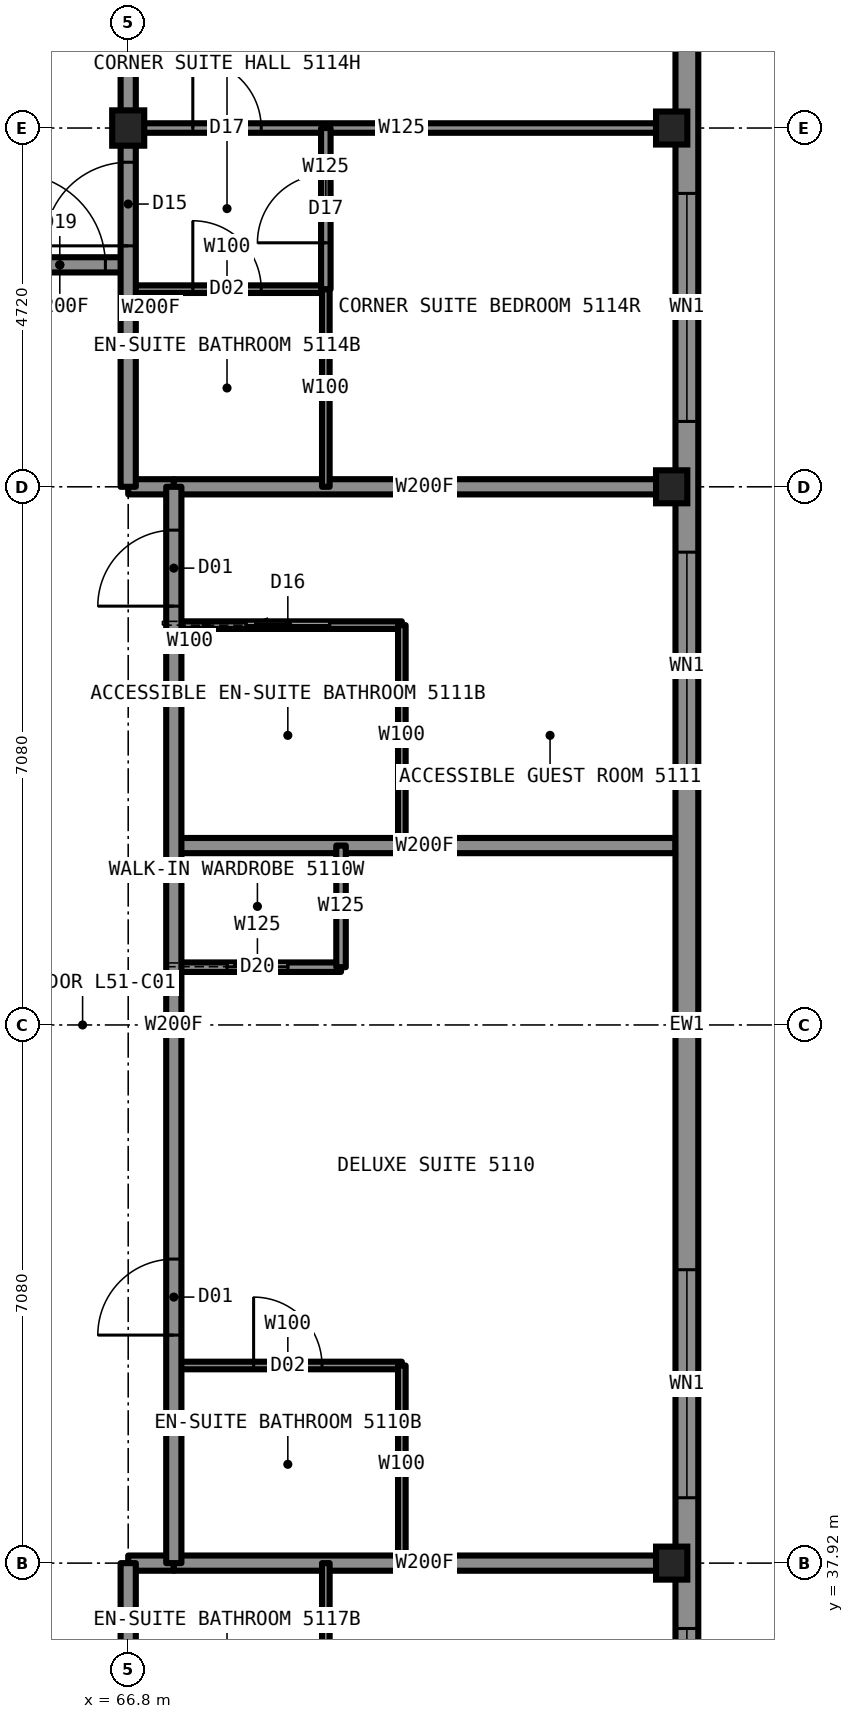
"""IFC4 building model, lengths in metres.
Left out: names, types, materials, properties, quantities, classifications, styles, units other than length and angle.
Written with IfcOpenShell. Run it as: python <this file> out.ifc"""

import sys

from ifc_helpers import new_model, si_unit, direction, frame, frame_2d, origin, origin_2d, place, context, subcontext, project, spatial, rectangle, i_section, extrude, element, fill, save


model = new_model("IFC4")
c1 = context("Model", 3, precision=1e-05, world=origin(), true_north=direction((0.0, 1.0)))
c2 = subcontext(c1, "Body", "Model", "MODEL_VIEW")
j1 = project(units=[si_unit("LENGTHUNIT", "METRE"), si_unit("PLANEANGLEUNIT", "RADIAN")], contexts=[c1])
p1 = place(None, origin())
s1 = spatial("IfcSite", under=j1, at=p1, CompositionType="ELEMENT")
p2 = place(p1, origin())
s2 = spatial("IfcBuilding", under=s1, at=p2, CompositionType="ELEMENT")
p3 = place(p2, frame((0.0, 0.0, 182.8)))
s3 = spatial("IfcBuildingStorey", under=s2, at=p3, CompositionType="ELEMENT", Elevation=182.8)
for number, where, z_axis, x_axis in (
    (1, (73.95, 37.92, 0.0), (0.0, 0.0, 1.0), (1.0, 0.0, 0.0)),
    (2, (73.95, 52.08, 0.0), (0.0, 0.0, 1.0), (1.0, 0.0, 0.0)),
    (3, (73.95, 56.8, 0.0), (0.0, 0.0, 1.0), (1.0, 0.0, 0.0)),
):
    element("IfcColumn", number, at=place(p3, frame(where, z_axis=z_axis, x_axis=x_axis)), inside=s3, PredefinedType="COLUMN", context=c2, shape_type="SweptSolid", body=[
        extrude(i_section(OverallWidth=0.411, OverallDepth=0.434, WebThickness=0.036, FlangeThickness=0.057, at=origin_2d()), origin(), (0.0, 0.0, 1.0), 3.5),
    ])
p4 = place(p3, frame((66.8, 56.8, 0.0), z_axis=(0.0, 0.0, 1.0), x_axis=(1.0, 0.0, 0.0)))
e4 = element("IfcColumn", 4, at=p4, inside=s3, PredefinedType="COLUMN", context=c2, shape_type="SweptSolid", body=[
    extrude(i_section(OverallWidth=0.422, OverallDepth=0.465, WebThickness=0.045, FlangeThickness=0.073, at=origin_2d()), origin(), (0.0, 0.0, 1.0), 3.5),
])
p5 = place(p3, frame((67.4, 40.52, 0.0), z_axis=(0.0, 0.0, 1.0), x_axis=(1.0, 0.0, 0.0)))
e5 = element("IfcWall", 5, at=p5, inside=s3, PredefinedType="PARTITIONING", context=c2, shape_type="SweptSolid", body=[
    extrude(rectangle(XDim=3.0, YDim=0.1, at=frame_2d((1.5, 0.0))), origin(), (0.0, 0.0, 1.0), 3.33),
])
p6 = place(p5, frame((1.05, 0.0, 0.0)))
e6 = element("IfcOpeningElement", 6, at=p6, cuts=e5, PredefinedType="OPENING", context=c2, shape_type="SweptSolid", body=[
    extrude(rectangle(XDim=0.9, YDim=2.1, at=frame_2d((0.45, 1.05))), frame((0.0, 0.06, 0.0), z_axis=(0.0, -1.0, 0.0), x_axis=(1.0, 0.0, 0.0)), (0.0, 0.0, 1.0), 0.12),
])
p7 = place(p3, frame((66.8, 37.92, 0.0), z_axis=(0.0, 0.0, 1.0), x_axis=(1.0, 0.0, 0.0)))
e7 = element("IfcWall", 7, at=p7, inside=s3, PredefinedType="PARTITIONING", context=c2, shape_type="SweptSolid", body=[
    extrude(rectangle(XDim=0.6, YDim=0.2, at=frame_2d((0.3, 0.0))), origin(), (0.0, 0.0, 1.0), 2.573),
])
p8 = place(p3, frame((67.4, 37.92, 0.0), z_axis=(0.0, 0.0, 1.0), x_axis=(1.0, 0.0, 0.0)))
e8 = element("IfcWall", 8, at=p8, inside=s3, PredefinedType="PARTITIONING", context=c2, shape_type="SweptSolid", body=[
    extrude(rectangle(XDim=6.6, YDim=0.2, at=frame_2d((3.3, 0.0))), origin(), (0.0, 0.0, 1.0), 2.573),
])
p9 = place(p3, frame((67.4, 45.76, 0.0), z_axis=(0.0, 0.0, 1.0), x_axis=(1.0, 0.0, 0.0)))
e9 = element("IfcWall", 9, at=p9, inside=s3, PredefinedType="PARTITIONING", context=c2, shape_type="SweptSolid", body=[
    extrude(rectangle(XDim=2.2, YDim=0.125, at=frame_2d((1.1, 0.0))), origin(), (0.0, 0.0, 1.0), 3.33),
])
p10 = place(p9, frame((0.7, 0.0, 0.0)))
e10 = element("IfcOpeningElement", 10, at=p10, cuts=e9, PredefinedType="OPENING", context=c2, shape_type="SweptSolid", body=[
    extrude(rectangle(XDim=0.8, YDim=2.1, at=frame_2d((0.4, 1.05))), frame((0.0, 0.073, 0.0), z_axis=(0.0, -1.0, 0.0), x_axis=(1.0, 0.0, 0.0)), (0.0, 0.0, 1.0), 0.145),
])
p11 = place(p3, frame((65.0, 55.0, 0.0), z_axis=(0.0, 0.0, 1.0), x_axis=(1.0, 0.0, 0.0)))
e11 = element("IfcWall", 11, at=p11, inside=s3, PredefinedType="PARTITIONING", context=c2, shape_type="SweptSolid", body=[
    extrude(rectangle(XDim=1.8, YDim=0.2, at=frame_2d((0.9, 0.0))), origin(), (0.0, 0.0, 1.0), 3.33),
])
p12 = place(p11, frame((0.3, 0.0, 0.0)))
e12 = element("IfcOpeningElement", 12, at=p12, cuts=e11, PredefinedType="OPENING", context=c2, shape_type="SweptSolid", body=[
    extrude(rectangle(XDim=1.2, YDim=2.2, at=frame_2d((0.6, 1.1))), frame((0.0, 0.11, 0.0), z_axis=(0.0, -1.0, 0.0), x_axis=(1.0, 0.0, 0.0)), (0.0, 0.0, 1.0), 0.22),
])
p13 = place(p3, frame((66.8, 56.8, 0.0), z_axis=(0.0, 0.0, 1.0), x_axis=(1.0, 0.0, 0.0)))
e13 = element("IfcWall", 13, at=p13, inside=s3, PredefinedType="PARTITIONING", context=c2, shape_type="SweptSolid", body=[
    extrude(rectangle(XDim=7.2, YDim=0.125, at=frame_2d((3.6, 0.0))), origin(), (0.0, 0.0, 1.0), 2.573),
])
p14 = place(p13, frame((0.85, 0.0, 0.0)))
e14 = element("IfcOpeningElement", 14, at=p14, cuts=e13, PredefinedType="OPENING", context=c2, shape_type="SweptSolid", body=[
    extrude(rectangle(XDim=0.9, YDim=2.2, at=frame_2d((0.45, 1.1))), frame((0.0, 0.073, 0.0), z_axis=(0.0, -1.0, 0.0), x_axis=(1.0, 0.0, 0.0)), (0.0, 0.0, 1.0), 0.145),
])
p15 = place(p3, frame((67.4, 47.36, 0.0), z_axis=(0.0, 0.0, 1.0), x_axis=(1.0, 0.0, 0.0)))
e15 = element("IfcWall", 15, at=p15, inside=s3, PredefinedType="PARTITIONING", context=c2, shape_type="SweptSolid", body=[
    extrude(rectangle(XDim=6.6, YDim=0.2, at=frame_2d((3.3, 0.0))), origin(), (0.0, 0.0, 1.0), 2.73),
])
p16 = place(p3, frame((67.4, 50.26, 0.0), z_axis=(0.0, 0.0, 1.0), x_axis=(1.0, 0.0, 0.0)))
e16 = element("IfcWall", 16, at=p16, inside=s3, PredefinedType="PARTITIONING", context=c2, shape_type="SweptSolid", body=[
    extrude(rectangle(XDim=3.0, YDim=0.1, at=frame_2d((1.5, 0.0))), origin(), (0.0, 0.0, 1.0), 3.33),
])
p17 = place(p16, frame((0.95, 0.0, 0.0)))
e17 = element("IfcOpeningElement", 17, at=p17, cuts=e16, PredefinedType="OPENING", context=c2, shape_type="SweptSolid", body=[
    extrude(rectangle(XDim=1.1, YDim=2.1, at=frame_2d((0.55, 1.05))), frame((0.0, 0.06, 0.0), z_axis=(0.0, -1.0, 0.0), x_axis=(1.0, 0.0, 0.0)), (0.0, 0.0, 1.0), 0.12),
])
p18 = place(p3, frame((66.8, 52.08, 0.0), z_axis=(0.0, 0.0, 1.0), x_axis=(1.0, 0.0, 0.0)))
e18 = element("IfcWall", 18, at=p18, inside=s3, PredefinedType="PARTITIONING", context=c2, shape_type="SweptSolid", body=[
    extrude(rectangle(XDim=0.6, YDim=0.2, at=frame_2d((0.3, 0.0))), origin(), (0.0, 0.0, 1.0), 2.573),
])
p19 = place(p3, frame((67.4, 52.08, 0.0), z_axis=(0.0, 0.0, 1.0), x_axis=(1.0, 0.0, 0.0)))
e19 = element("IfcWall", 19, at=p19, inside=s3, PredefinedType="PARTITIONING", context=c2, shape_type="SweptSolid", body=[
    extrude(rectangle(XDim=6.6, YDim=0.2, at=frame_2d((3.3, 0.0))), origin(), (0.0, 0.0, 1.0), 2.573),
])
p20 = place(p3, frame((66.8, 54.68, 0.0), z_axis=(0.0, 0.0, 1.0), x_axis=(1.0, 0.0, 0.0)))
e20 = element("IfcWall", 20, at=p20, inside=s3, PredefinedType="PARTITIONING", context=c2, shape_type="SweptSolid", body=[
    extrude(rectangle(XDim=2.6, YDim=0.1, at=frame_2d((1.3, 0.0))), origin(), (0.0, 0.0, 1.0), 3.33),
])
p21 = place(p20, frame((0.85, 0.0, 0.0)))
e21 = element("IfcOpeningElement", 21, at=p21, cuts=e20, PredefinedType="OPENING", context=c2, shape_type="SweptSolid", body=[
    extrude(rectangle(XDim=0.9, YDim=2.1, at=frame_2d((0.45, 1.05))), frame((0.0, 0.06, 0.0), z_axis=(0.0, -1.0, 0.0), x_axis=(1.0, 0.0, 0.0)), (0.0, 0.0, 1.0), 0.12),
])
p22 = place(p3, frame((66.8, 33.2, 0.0), z_axis=(0.0, 0.0, 1.0), x_axis=(0.0, 1.0, 0.0)))
e22 = element("IfcWall", 22, at=p22, inside=s3, PredefinedType="PARTITIONING", context=c2, shape_type="SweptSolid", body=[
    extrude(rectangle(XDim=4.72, YDim=0.2, at=frame_2d((2.36, 0.0))), origin(), (0.0, 0.0, 1.0), 3.33),
])
p23 = place(p22, frame((0.66, 0.0, 0.0)))
e23 = element("IfcOpeningElement", 23, at=p23, cuts=e22, PredefinedType="OPENING", context=c2, shape_type="SweptSolid", body=[
    extrude(rectangle(XDim=1.1, YDim=2.2, at=frame_2d((0.55, 1.1))), frame((0.0, 0.11, 0.0), z_axis=(0.0, -1.0, 0.0), x_axis=(1.0, 0.0, 0.0)), (0.0, 0.0, 1.0), 0.22),
])
p24 = place(p3, frame((66.8, 52.08, 0.0), z_axis=(0.0, 0.0, 1.0), x_axis=(0.0, 1.0, 0.0)))
e24 = element("IfcWall", 24, at=p24, inside=s3, PredefinedType="PARTITIONING", context=c2, shape_type="SweptSolid", body=[
    extrude(rectangle(XDim=4.7, YDim=0.2, at=frame_2d((2.35, 0.0))), origin(), (0.0, 0.0, 1.0), 3.33),
])
p25 = place(p24, frame((3.17, 0.0, 0.0)))
e25 = element("IfcOpeningElement", 25, at=p25, cuts=e24, PredefinedType="OPENING", context=c2, shape_type="SweptSolid", body=[
    extrude(rectangle(XDim=1.1, YDim=2.2, at=frame_2d((0.55, 1.1))), frame((0.0, 0.11, 0.0), z_axis=(0.0, -1.0, 0.0), x_axis=(1.0, 0.0, 0.0)), (0.0, 0.0, 1.0), 0.22),
])
p26 = place(p3, frame((67.4, 37.92, 0.0), z_axis=(0.0, 0.0, 1.0), x_axis=(0.0, 1.0, 0.0)))
e26 = element("IfcWall", 26, at=p26, inside=s3, PredefinedType="PARTITIONING", context=c2, shape_type="SweptSolid", body=[
    extrude(rectangle(XDim=14.16, YDim=0.2, at=frame_2d((7.08, 0.0))), origin(), (0.0, 0.0, 1.0), 3.33),
])
p27 = place(p26, frame((3.0, 0.0, 0.0)))
e27 = element("IfcOpeningElement", 27, at=p27, cuts=e26, PredefinedType="OPENING", context=c2, shape_type="SweptSolid", body=[
    extrude(rectangle(XDim=1.0, YDim=2.2, at=frame_2d((0.5, 1.1))), frame((0.0, 0.11, 0.0), z_axis=(0.0, -1.0, 0.0), x_axis=(1.0, 0.0, 0.0)), (0.0, 0.0, 1.0), 0.22),
])
p28 = place(p26, frame((12.59, 0.0, 0.0)))
e28 = element("IfcOpeningElement", 28, at=p28, cuts=e26, PredefinedType="OPENING", context=c2, shape_type="SweptSolid", body=[
    extrude(rectangle(XDim=1.0, YDim=2.2, at=frame_2d((0.5, 1.1))), frame((0.0, 0.11, 0.0), z_axis=(0.0, -1.0, 0.0), x_axis=(1.0, 0.0, 0.0)), (0.0, 0.0, 1.0), 0.22),
])
for number, where, z_axis, x_axis in (
    (29, (69.4, 35.32, 0.0), (0.0, 0.0, 1.0), (0.0, 1.0, 0.0)),
    (30, (69.4, 52.08, 0.0), (0.0, 0.0, 1.0), (0.0, 1.0, 0.0)),
):
    element("IfcWall", number, at=place(p3, frame(where, z_axis=z_axis, x_axis=x_axis)), inside=s3, PredefinedType="PARTITIONING", context=c2, shape_type="SweptSolid", body=[
        extrude(rectangle(XDim=2.6, YDim=0.1, at=frame_2d((1.3, 0.0))), origin(), (0.0, 0.0, 1.0), 3.33),
    ])
p29 = place(p3, frame((69.4, 54.68, 0.0), z_axis=(0.0, 0.0, 1.0), x_axis=(0.0, 1.0, 0.0)))
e31 = element("IfcWall", 31, at=p29, inside=s3, PredefinedType="PARTITIONING", context=c2, shape_type="SweptSolid", body=[
    extrude(rectangle(XDim=2.12, YDim=0.125, at=frame_2d((1.06, 0.0))), origin(), (0.0, 0.0, 1.0), 3.33),
])
p30 = place(p29, frame((0.61, 0.0, 0.0)))
e32 = element("IfcOpeningElement", 32, at=p30, cuts=e31, PredefinedType="OPENING", context=c2, shape_type="SweptSolid", body=[
    extrude(rectangle(XDim=0.9, YDim=2.2, at=frame_2d((0.45, 1.1))), frame((0.0, 0.073, 0.0), z_axis=(0.0, -1.0, 0.0), x_axis=(1.0, 0.0, 0.0)), (0.0, 0.0, 1.0), 0.145),
])
p31 = place(p3, frame((69.6, 45.76, 0.0), z_axis=(0.0, 0.0, 1.0), x_axis=(0.0, 1.0, 0.0)))
e33 = element("IfcWall", 33, at=p31, inside=s3, PredefinedType="PARTITIONING", context=c2, shape_type="SweptSolid", body=[
    extrude(rectangle(XDim=1.6, YDim=0.125, at=frame_2d((0.8, 0.0))), origin(), (0.0, 0.0, 1.0), 3.33),
])
p32 = place(p3, frame((70.4, 37.92, 0.0), z_axis=(0.0, 0.0, 1.0), x_axis=(0.0, 1.0, 0.0)))
e34 = element("IfcWall", 34, at=p32, inside=s3, PredefinedType="PARTITIONING", context=c2, shape_type="SweptSolid", body=[
    extrude(rectangle(XDim=2.6, YDim=0.1, at=frame_2d((1.3, 0.0))), origin(), (0.0, 0.0, 1.0), 3.33),
])
p33 = place(p3, frame((70.4, 47.36, 0.0), z_axis=(0.0, 0.0, 1.0), x_axis=(0.0, 1.0, 0.0)))
e35 = element("IfcWall", 35, at=p33, inside=s3, PredefinedType="PARTITIONING", context=c2, shape_type="SweptSolid", body=[
    extrude(rectangle(XDim=2.9, YDim=0.1, at=frame_2d((1.45, 0.0))), origin(), (0.0, 0.0, 1.0), 3.33),
])
p34 = place(p3, frame((74.15, 31.2, 0.0), z_axis=(0.0, 0.0, 1.0), x_axis=(0.0, 1.0, 0.0)))
e36 = element("IfcWall", 36, at=p34, inside=s3, PredefinedType="SOLIDWALL", context=c2, shape_type="SweptSolid", body=[
    extrude(rectangle(XDim=27.6, YDim=0.3, at=frame_2d((13.8, 0.0))), origin(), (0.0, 0.0, 1.0), 2.83),
])
p35 = place(p34, frame((2.86, 0.0, 0.3)))
e37 = element("IfcOpeningElement", 37, at=p35, cuts=e36, PredefinedType="OPENING", context=c2, shape_type="SweptSolid", body=[
    extrude(rectangle(XDim=3.0, YDim=2.0, at=frame_2d((1.5, 1.0))), frame((0.0, 0.16, 0.0), z_axis=(0.0, -1.0, 0.0), x_axis=(1.0, 0.0, 0.0)), (0.0, 0.0, 1.0), 0.32),
])
p36 = place(p34, frame((9.88, 0.0, 0.3)))
e38 = element("IfcOpeningElement", 38, at=p36, cuts=e36, PredefinedType="OPENING", context=c2, shape_type="SweptSolid", body=[
    extrude(rectangle(XDim=0.7, YDim=1.1, at=frame_2d((0.35, 0.55))), frame((0.0, 0.16, 0.0), z_axis=(0.0, -1.0, 0.0), x_axis=(1.0, 0.0, 0.0)), (0.0, 0.0, 1.0), 0.32),
])
p37 = place(p34, frame((12.3, 0.0, 0.3)))
e39 = element("IfcOpeningElement", 39, at=p37, cuts=e36, PredefinedType="OPENING", context=c2, shape_type="SweptSolid", body=[
    extrude(rectangle(XDim=3.0, YDim=2.0, at=frame_2d((1.5, 1.0))), frame((0.0, 0.16, 0.0), z_axis=(0.0, -1.0, 0.0), x_axis=(1.0, 0.0, 0.0)), (0.0, 0.0, 1.0), 0.32),
])
p38 = place(p34, frame((17.02, 0.0, 0.3)))
e40 = element("IfcOpeningElement", 40, at=p38, cuts=e36, PredefinedType="OPENING", context=c2, shape_type="SweptSolid", body=[
    extrude(rectangle(XDim=0.7, YDim=1.1, at=frame_2d((0.35, 0.55))), frame((0.0, 0.16, 0.0), z_axis=(0.0, -1.0, 0.0), x_axis=(1.0, 0.0, 0.0)), (0.0, 0.0, 1.0), 0.32),
])
p39 = place(p34, frame((21.74, 0.0, 0.3)))
e41 = element("IfcOpeningElement", 41, at=p39, cuts=e36, PredefinedType="OPENING", context=c2, shape_type="SweptSolid", body=[
    extrude(rectangle(XDim=3.0, YDim=2.0, at=frame_2d((1.5, 1.0))), frame((0.0, 0.16, 0.0), z_axis=(0.0, -1.0, 0.0), x_axis=(1.0, 0.0, 0.0)), (0.0, 0.0, 1.0), 0.32),
])
p40 = place(p3, frame((66.8, 56.78, 0.0), z_axis=(0.0, 0.0, 1.0), x_axis=(0.0, 1.0, 0.0)))
e42 = element("IfcWall", 42, at=p40, inside=s3, PredefinedType="PARTITIONING", context=c2, shape_type="SweptSolid", body=[
    extrude(rectangle(XDim=2.82, YDim=0.2, at=frame_2d((1.41, 0.0))), origin(), (0.0, 0.0, 1.0), 2.573),
])
p41 = place(p12, origin())
e43 = element("IfcDoor", 43, at=p41, inside=s3, OperationType="SINGLE_SWING_LEFT", PredefinedType="DOOR", context=c2, shape_type="SweptSolid", body=[
    extrude(rectangle(XDim=1.2, YDim=2.2, at=frame_2d((0.6, 1.1))), frame((0.0, 0.025, 0.0), z_axis=(0.0, -1.0, 0.0), x_axis=(1.0, 0.0, 0.0)), (0.0, 0.0, 1.0), 0.05),
])
fill(e12, e43)
p42 = place(p27, origin())
e44 = element("IfcDoor", 44, at=p42, inside=s3, OperationType="SINGLE_SWING_LEFT", PredefinedType="DOOR", context=c2, shape_type="SweptSolid", body=[
    extrude(rectangle(XDim=1.0, YDim=2.2, at=frame_2d((0.5, 1.1))), frame((0.0, 0.025, 0.0), z_axis=(0.0, -1.0, 0.0), x_axis=(1.0, 0.0, 0.0)), (0.0, 0.0, 1.0), 0.05),
])
fill(e27, e44)
p43 = place(p6, origin())
e45 = element("IfcDoor", 45, at=p43, inside=s3, OperationType="SINGLE_SWING_RIGHT", PredefinedType="DOOR", context=c2, shape_type="SweptSolid", body=[
    extrude(rectangle(XDim=0.9, YDim=2.1, at=frame_2d((0.45, 1.05))), frame((0.0, 0.025, 0.0), z_axis=(0.0, -1.0, 0.0), x_axis=(1.0, 0.0, 0.0)), (0.0, 0.0, 1.0), 0.05),
])
fill(e6, e45)
p44 = place(p10, origin())
e46 = element("IfcDoor", 46, at=p44, inside=s3, OperationType="SLIDING_TO_LEFT", PredefinedType="DOOR", context=c2, shape_type="SweptSolid", body=[
    extrude(rectangle(XDim=0.8, YDim=2.1, at=frame_2d((0.4, 1.05))), frame((0.0, 0.025, 0.0), z_axis=(0.0, -1.0, 0.0), x_axis=(1.0, 0.0, 0.0)), (0.0, 0.0, 1.0), 0.05),
])
fill(e10, e46)
p45 = place(p28, origin())
e47 = element("IfcDoor", 47, at=p45, inside=s3, OperationType="SINGLE_SWING_LEFT", PredefinedType="DOOR", context=c2, shape_type="SweptSolid", body=[
    extrude(rectangle(XDim=1.0, YDim=2.2, at=frame_2d((0.5, 1.1))), frame((0.0, 0.025, 0.0), z_axis=(0.0, -1.0, 0.0), x_axis=(1.0, 0.0, 0.0)), (0.0, 0.0, 1.0), 0.05),
])
fill(e28, e47)
p46 = place(p17, origin())
e48 = element("IfcDoor", 48, at=p46, inside=s3, OperationType="SLIDING_TO_LEFT", PredefinedType="DOOR", context=c2, shape_type="SweptSolid", body=[
    extrude(rectangle(XDim=1.1, YDim=2.1, at=frame_2d((0.55, 1.05))), frame((0.0, 0.025, 0.0), z_axis=(0.0, -1.0, 0.0), x_axis=(1.0, 0.0, 0.0)), (0.0, 0.0, 1.0), 0.05),
])
fill(e17, e48)
p47 = place(p14, origin())
e49 = element("IfcDoor", 49, at=p47, inside=s3, OperationType="SINGLE_SWING_LEFT", PredefinedType="DOOR", context=c2, shape_type="SweptSolid", body=[
    extrude(rectangle(XDim=0.9, YDim=2.2, at=frame_2d((0.45, 1.1))), frame((0.0, 0.025, 0.0), z_axis=(0.0, -1.0, 0.0), x_axis=(1.0, 0.0, 0.0)), (0.0, 0.0, 1.0), 0.05),
])
fill(e14, e49)
p48 = place(p21, origin())
e50 = element("IfcDoor", 50, at=p48, inside=s3, OperationType="SINGLE_SWING_RIGHT", PredefinedType="DOOR", context=c2, shape_type="SweptSolid", body=[
    extrude(rectangle(XDim=0.9, YDim=2.1, at=frame_2d((0.45, 1.05))), frame((0.0, 0.025, 0.0), z_axis=(0.0, -1.0, 0.0), x_axis=(1.0, 0.0, 0.0)), (0.0, 0.0, 1.0), 0.05),
])
fill(e21, e50)
p49 = place(p25, origin())
e51 = element("IfcDoor", 51, at=p49, inside=s3, OperationType="SINGLE_SWING_LEFT", PredefinedType="DOOR", context=c2, shape_type="SweptSolid", body=[
    extrude(rectangle(XDim=1.1, YDim=2.2, at=frame_2d((0.55, 1.1))), frame((0.0, 0.025, 0.0), z_axis=(0.0, -1.0, 0.0), x_axis=(1.0, 0.0, 0.0)), (0.0, 0.0, 1.0), 0.05),
])
fill(e25, e51)
p50 = place(p30, origin())
e52 = element("IfcDoor", 52, at=p50, inside=s3, OperationType="SINGLE_SWING_LEFT", PredefinedType="DOOR", context=c2, shape_type="SweptSolid", body=[
    extrude(rectangle(XDim=0.9, YDim=2.2, at=frame_2d((0.45, 1.1))), frame((0.0, 0.025, 0.0), z_axis=(0.0, -1.0, 0.0), x_axis=(1.0, 0.0, 0.0)), (0.0, 0.0, 1.0), 0.05),
])
fill(e32, e52)
p51 = place(p35, origin())
e53 = element("IfcWindow", 53, at=p51, inside=s3, PartitioningType="SINGLE_PANEL", PredefinedType="WINDOW", context=c2, shape_type="SweptSolid", body=[
    extrude(rectangle(XDim=3.0, YDim=2.0, at=frame_2d((1.5, 1.0))), frame((0.0, 0.13, 0.0), z_axis=(0.0, -1.0, 0.0), x_axis=(1.0, 0.0, 0.0)), (0.0, 0.0, 1.0), 0.06),
])
fill(e37, e53)
p52 = place(p36, origin())
e54 = element("IfcWindow", 54, at=p52, inside=s3, PartitioningType="SINGLE_PANEL", PredefinedType="WINDOW", context=c2, shape_type="SweptSolid", body=[
    extrude(rectangle(XDim=0.7, YDim=1.1, at=frame_2d((0.35, 0.55))), frame((0.0, 0.13, 0.0), z_axis=(0.0, -1.0, 0.0), x_axis=(1.0, 0.0, 0.0)), (0.0, 0.0, 1.0), 0.06),
])
fill(e38, e54)
p53 = place(p37, origin())
e55 = element("IfcWindow", 55, at=p53, inside=s3, PartitioningType="SINGLE_PANEL", PredefinedType="WINDOW", context=c2, shape_type="SweptSolid", body=[
    extrude(rectangle(XDim=3.0, YDim=2.0, at=frame_2d((1.5, 1.0))), frame((0.0, 0.13, 0.0), z_axis=(0.0, -1.0, 0.0), x_axis=(1.0, 0.0, 0.0)), (0.0, 0.0, 1.0), 0.06),
])
fill(e39, e55)
p54 = place(p38, origin())
e56 = element("IfcWindow", 56, at=p54, inside=s3, PartitioningType="SINGLE_PANEL", PredefinedType="WINDOW", context=c2, shape_type="SweptSolid", body=[
    extrude(rectangle(XDim=0.7, YDim=1.1, at=frame_2d((0.35, 0.55))), frame((0.0, 0.13, 0.0), z_axis=(0.0, -1.0, 0.0), x_axis=(1.0, 0.0, 0.0)), (0.0, 0.0, 1.0), 0.06),
])
fill(e40, e56)
p55 = place(p39, origin())
e57 = element("IfcWindow", 57, at=p55, inside=s3, PartitioningType="SINGLE_PANEL", PredefinedType="WINDOW", context=c2, shape_type="SweptSolid", body=[
    extrude(rectangle(XDim=3.0, YDim=2.0, at=frame_2d((1.5, 1.0))), frame((0.0, 0.13, 0.0), z_axis=(0.0, -1.0, 0.0), x_axis=(1.0, 0.0, 0.0)), (0.0, 0.0, 1.0), 0.06),
])
fill(e41, e57)
save(model, sys.argv[1])
